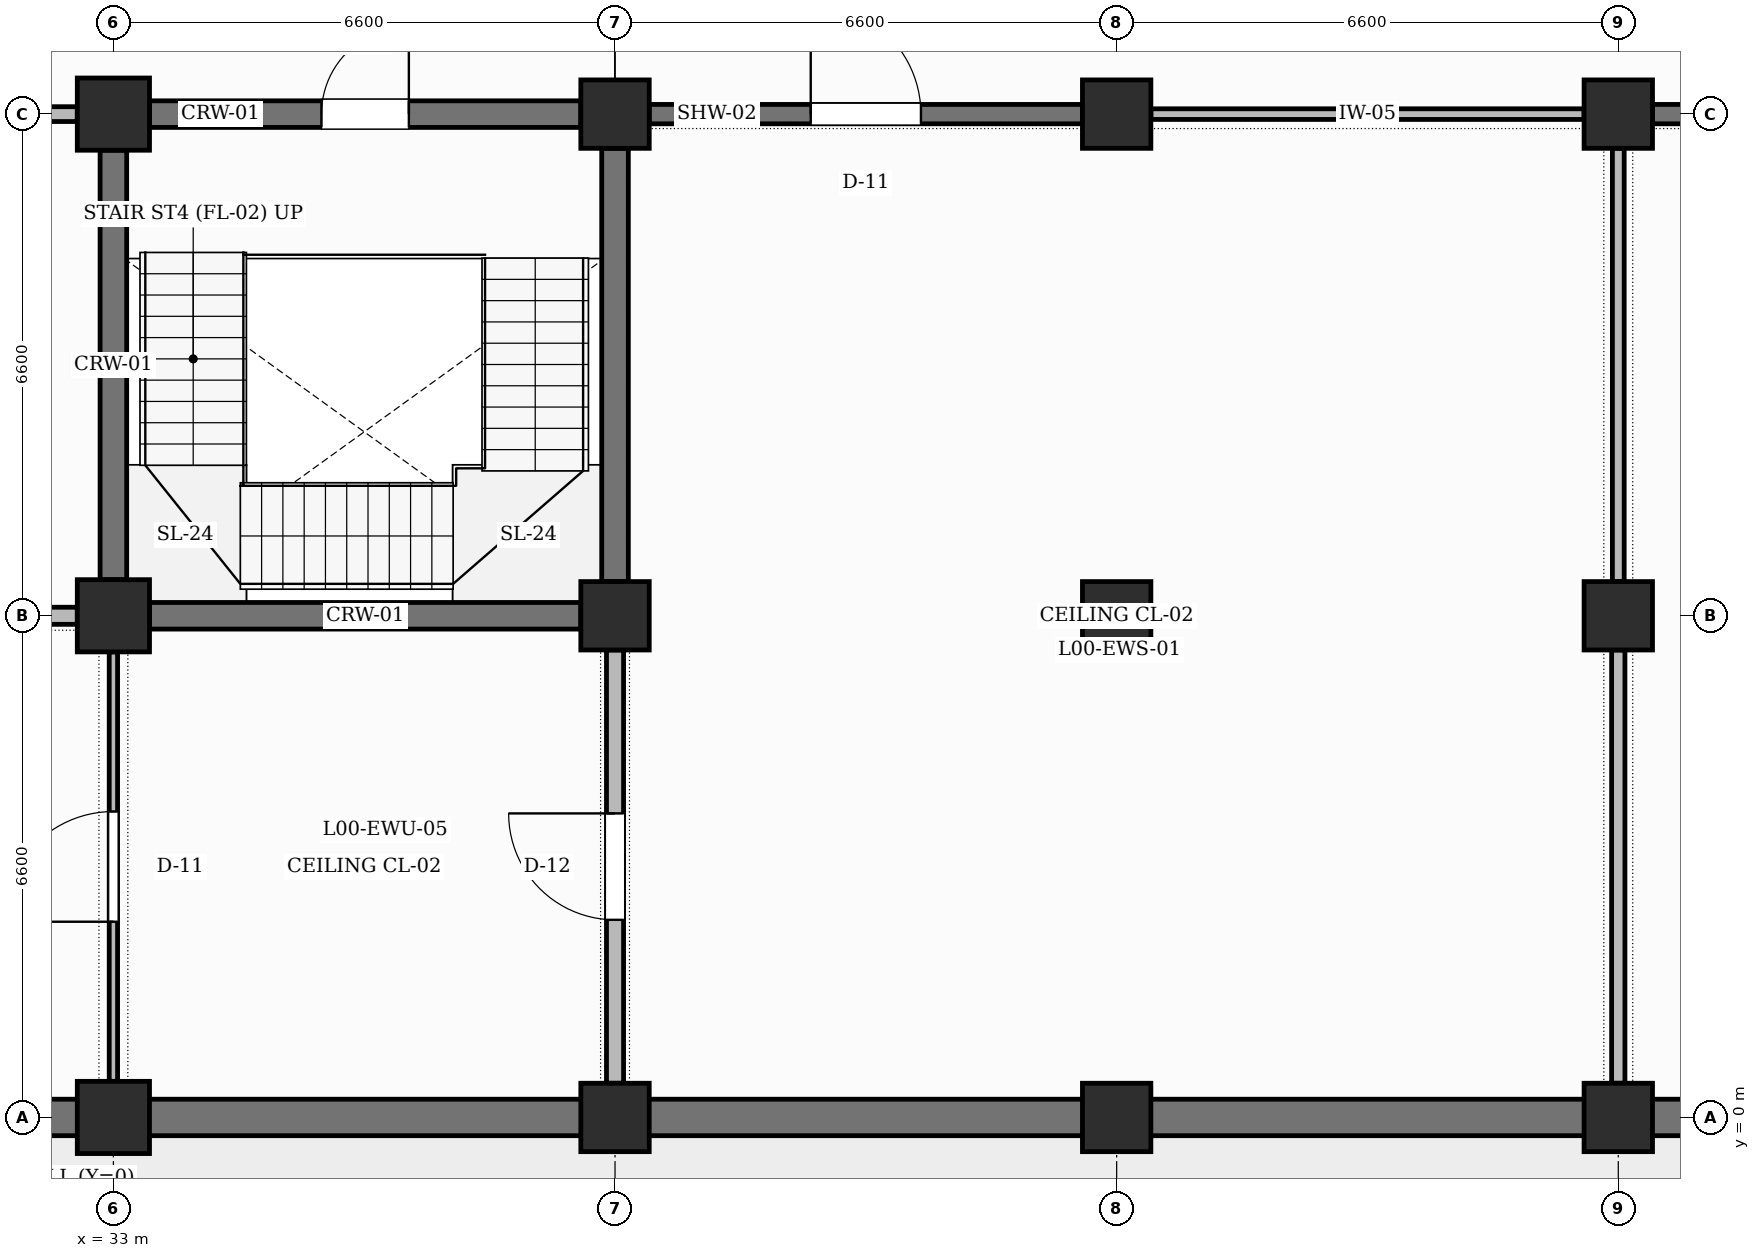
"""IFC4 building model, lengths in metres.
Left out: names, types, materials, properties, quantities, classifications, styles, units other than length and angle.
Written with IfcOpenShell. Run it as: python <this file> out.ifc"""

import sys

from ifc_helpers import new_model, si_unit, direction, frame, frame_2d, origin, origin_2d, place, context, subcontext, project, spatial, rectangle, extrude, element, fill, save


model = new_model("IFC4")
c1 = context("Model", 3, precision=1e-05, world=origin(), true_north=direction((0.0, 1.0)))
c2 = subcontext(c1, "Body", "Model", "MODEL_VIEW")
j1 = project(units=[si_unit("LENGTHUNIT", "METRE"), si_unit("PLANEANGLEUNIT", "RADIAN")], contexts=[c1])
p1 = place(None, origin())
s1 = spatial("IfcSite", under=j1, at=p1, CompositionType="ELEMENT")
p2 = place(p1, origin())
s2 = spatial("IfcBuilding", under=s1, at=p2, CompositionType="ELEMENT")
p3 = place(p2, origin())
s3 = spatial("IfcBuildingStorey", under=s2, at=p3, CompositionType="ELEMENT", Elevation=0.0)
for number, where, z_axis, x_axis in (
    (1, (33.0, 0.0, 0.0), (0.0, 0.0, 1.0), (1.0, 0.0, 0.0)),
    (2, (33.0, 6.6, 0.0), (0.0, 0.0, 1.0), (1.0, 0.0, 0.0)),
    (3, (33.0, 13.2, 0.0), (0.0, 0.0, 1.0), (1.0, 0.0, 0.0)),
):
    element("IfcColumn", number, at=place(p3, frame(where, z_axis=z_axis, x_axis=x_axis)), inside=s3, PredefinedType="COLUMN", context=c2, shape_type="SweptSolid", body=[
        extrude(rectangle(XDim=0.95, YDim=0.95, at=origin_2d()), origin(), (0.0, 0.0, 1.0), 5.4),
    ])
for number, where, z_axis, x_axis in (
    (4, (39.6, 0.0, 0.0), (0.0, 0.0, 1.0), (1.0, 0.0, 0.0)),
    (5, (39.6, 6.6, 0.0), (0.0, 0.0, 1.0), (1.0, 0.0, 0.0)),
    (6, (39.6, 13.2, 0.0), (0.0, 0.0, 1.0), (1.0, 0.0, 0.0)),
    (7, (46.2, 0.0, 0.0), (0.0, 0.0, 1.0), (1.0, 0.0, 0.0)),
    (8, (46.2, 6.6, 0.0), (0.0, 0.0, 1.0), (1.0, 0.0, 0.0)),
    (9, (46.2, 13.2, 0.0), (0.0, 0.0, 1.0), (1.0, 0.0, 0.0)),
    (10, (52.8, 0.0, 0.0), (0.0, 0.0, 1.0), (1.0, 0.0, 0.0)),
    (11, (52.8, 6.6, 0.0), (0.0, 0.0, 1.0), (1.0, 0.0, 0.0)),
    (12, (52.8, 13.2, 0.0), (0.0, 0.0, 1.0), (1.0, 0.0, 0.0)),
):
    element("IfcColumn", number, at=place(p3, frame(where, z_axis=z_axis, x_axis=x_axis)), inside=s3, PredefinedType="COLUMN", context=c2, shape_type="SweptSolid", body=[
        extrude(rectangle(XDim=0.9, YDim=0.9, at=origin_2d()), origin(), (0.0, 0.0, 1.0), 5.4),
    ])
p4 = place(p3, frame((26.875, 0.0, 0.0), z_axis=(0.0, 0.0, 1.0), x_axis=(1.0, 0.0, 0.0)))
e13 = element("IfcWall", 13, at=p4, inside=s3, PredefinedType="SOLIDWALL", context=c2, shape_type="SweptSolid", body=[
    extrude(rectangle(XDim=5.65, YDim=0.48, at=frame_2d((2.825, 0.0))), origin(), (0.0, 0.0, 1.0), 4.45),
])
p5 = place(p3, frame((33.475, 0.0, 0.0), z_axis=(0.0, 0.0, 1.0), x_axis=(1.0, 0.0, 0.0)))
e14 = element("IfcWall", 14, at=p5, inside=s3, PredefinedType="SOLIDWALL", context=c2, shape_type="SweptSolid", body=[
    extrude(rectangle(XDim=5.675, YDim=0.48, at=frame_2d((2.837, 0.0))), origin(), (0.0, 0.0, 1.0), 4.45),
])
p6 = place(p3, frame((40.05, 0.0, 0.0), z_axis=(0.0, 0.0, 1.0), x_axis=(1.0, 0.0, 0.0)))
e15 = element("IfcWall", 15, at=p6, inside=s3, PredefinedType="SOLIDWALL", context=c2, shape_type="SweptSolid", body=[
    extrude(rectangle(XDim=5.7, YDim=0.48, at=frame_2d((2.85, 0.0))), origin(), (0.0, 0.0, 1.0), 4.45),
])
p7 = place(p3, frame((46.65, 0.0, 0.0), z_axis=(0.0, 0.0, 1.0), x_axis=(1.0, 0.0, 0.0)))
e16 = element("IfcWall", 16, at=p7, inside=s3, PredefinedType="SOLIDWALL", context=c2, shape_type="SweptSolid", body=[
    extrude(rectangle(XDim=5.7, YDim=0.48, at=frame_2d((2.85, 0.0))), origin(), (0.0, 0.0, 1.0), 4.45),
])
p8 = place(p3, frame((53.25, 0.0, 0.0), z_axis=(0.0, 0.0, 1.0), x_axis=(1.0, 0.0, 0.0)))
e17 = element("IfcWall", 17, at=p8, inside=s3, PredefinedType="SOLIDWALL", context=c2, shape_type="SweptSolid", body=[
    extrude(rectangle(XDim=5.7, YDim=0.48, at=frame_2d((2.85, 0.0))), origin(), (0.0, 0.0, 1.0), 4.45),
])
p9 = place(p3, frame((33.475, 6.6, 0.0), z_axis=(0.0, 0.0, 1.0), x_axis=(1.0, 0.0, 0.0)))
e18 = element("IfcWall", 18, at=p9, inside=s3, PredefinedType="SHEAR", context=c2, shape_type="SweptSolid", body=[
    extrude(rectangle(XDim=5.675, YDim=0.35, at=frame_2d((2.837, 0.0))), origin(), (0.0, 0.0, 1.0), 4.2),
])
p10 = place(p3, frame((33.475, 13.2, 0.0), z_axis=(0.0, 0.0, 1.0), x_axis=(1.0, 0.0, 0.0)))
e19 = element("IfcWall", 19, at=p10, inside=s3, PredefinedType="SHEAR", context=c2, shape_type="SweptSolid", body=[
    extrude(rectangle(XDim=5.675, YDim=0.35, at=frame_2d((2.837, 0.0))), origin(), (0.0, 0.0, 1.0), 4.3),
])
p11 = place(p10, frame((2.262, 0.0, 0.0)))
e20 = element("IfcOpeningElement", 20, at=p11, cuts=e19, PredefinedType="OPENING", context=c2, shape_type="SweptSolid", body=[
    extrude(rectangle(XDim=1.15, YDim=2.2, at=frame_2d((0.575, 1.1))), frame((0.0, 0.185, 0.0), z_axis=(0.0, -1.0, 0.0), x_axis=(1.0, 0.0, 0.0)), (0.0, 0.0, 1.0), 0.37),
])
p12 = place(p3, frame((33.0, 7.075, 0.0), z_axis=(0.0, 0.0, 1.0), x_axis=(0.0, 1.0, 0.0)))
e21 = element("IfcWall", 21, at=p12, inside=s3, PredefinedType="SHEAR", context=c2, shape_type="SweptSolid", body=[
    extrude(rectangle(XDim=5.65, YDim=0.35, at=frame_2d((2.825, 0.0))), origin(), (0.0, 0.0, 1.0), 4.3),
])
p13 = place(p3, frame((39.6, 7.05, 0.0), z_axis=(0.0, 0.0, 1.0), x_axis=(0.0, 1.0, 0.0)))
e22 = element("IfcWall", 22, at=p13, inside=s3, PredefinedType="SHEAR", context=c2, shape_type="SweptSolid", body=[
    extrude(rectangle(XDim=5.7, YDim=0.35, at=frame_2d((2.85, 0.0))), origin(), (0.0, 0.0, 1.0), 4.3),
])
p14 = place(p3, frame((33.0, 0.475, 0.0), z_axis=(0.0, 0.0, 1.0), x_axis=(0.0, 1.0, 0.0)))
e23 = element("IfcWall", 23, at=p14, inside=s3, PredefinedType="PARTITIONING", context=c2, shape_type="SweptSolid", body=[
    extrude(rectangle(XDim=5.65, YDim=0.11, at=frame_2d((2.825, 0.0))), origin(), (0.0, 0.0, 1.0), 4.3),
])
p15 = place(p14, frame((2.1, 0.0, 0.0)))
e24 = element("IfcOpeningElement", 24, at=p15, cuts=e23, PredefinedType="OPENING", context=c2, shape_type="SweptSolid", body=[
    extrude(rectangle(XDim=1.45, YDim=2.25, at=frame_2d((0.725, 1.125))), frame((0.0, 0.065, 0.0), z_axis=(0.0, -1.0, 0.0), x_axis=(1.0, 0.0, 0.0)), (0.0, 0.0, 1.0), 0.13),
])
p16 = place(p3, frame((26.875, 6.6, 0.0), z_axis=(0.0, 0.0, 1.0), x_axis=(1.0, 0.0, 0.0)))
e25 = element("IfcWall", 25, at=p16, inside=s3, PredefinedType="PARTITIONING", context=c2, shape_type="SweptSolid", body=[
    extrude(rectangle(XDim=5.65, YDim=0.225, at=frame_2d((2.825, 0.0))), origin(), (0.0, 0.0, 1.0), 4.3),
])
p17 = place(p3, frame((26.875, 13.2, 0.0), z_axis=(0.0, 0.0, 1.0), x_axis=(1.0, 0.0, 0.0)))
e26 = element("IfcWall", 26, at=p17, inside=s3, PredefinedType="PARTITIONING", context=c2, shape_type="SweptSolid", body=[
    extrude(rectangle(XDim=5.65, YDim=0.195, at=frame_2d((2.825, 0.0))), origin(), (0.0, 0.0, 1.0), 4.2),
])
p18 = place(p17, frame((2.225, 0.0, 0.0)))
e27 = element("IfcOpeningElement", 27, at=p18, cuts=e26, PredefinedType="OPENING", context=c2, shape_type="SweptSolid", body=[
    extrude(rectangle(XDim=1.2, YDim=2.25, at=frame_2d((0.6, 1.125))), frame((0.0, 0.107, 0.0), z_axis=(0.0, -1.0, 0.0), x_axis=(1.0, 0.0, 0.0)), (0.0, 0.0, 1.0), 0.215),
])
p19 = place(p3, frame((39.6, 0.45, 0.0), z_axis=(0.0, 0.0, 1.0), x_axis=(0.0, 1.0, 0.0)))
e28 = element("IfcWall", 28, at=p19, inside=s3, PredefinedType="PARTITIONING", context=c2, shape_type="SweptSolid", body=[
    extrude(rectangle(XDim=5.7, YDim=0.225, at=frame_2d((2.85, 0.0))), origin(), (0.0, 0.0, 1.0), 4.3),
])
p20 = place(p19, frame((2.15, 0.0, 0.0)))
e29 = element("IfcOpeningElement", 29, at=p20, cuts=e28, PredefinedType="OPENING", context=c2, shape_type="SweptSolid", body=[
    extrude(rectangle(XDim=1.4, YDim=2.25, at=frame_2d((0.7, 1.125))), frame((0.0, 0.123, 0.0), z_axis=(0.0, -1.0, 0.0), x_axis=(1.0, 0.0, 0.0)), (0.0, 0.0, 1.0), 0.245),
])
p21 = place(p3, frame((40.05, 13.2, 0.0), z_axis=(0.0, 0.0, 1.0), x_axis=(1.0, 0.0, 0.0)))
e30 = element("IfcWall", 30, at=p21, inside=s3, PredefinedType="SHEAR", context=c2, shape_type="SweptSolid", body=[
    extrude(rectangle(XDim=5.7, YDim=0.255, at=frame_2d((2.85, 0.0))), origin(), (0.0, 0.0, 1.0), 4.2),
])
p22 = place(p21, frame((2.125, 0.0, 0.0)))
e31 = element("IfcOpeningElement", 31, at=p22, cuts=e30, PredefinedType="OPENING", context=c2, shape_type="SweptSolid", body=[
    extrude(rectangle(XDim=1.45, YDim=2.25, at=frame_2d((0.725, 1.125))), frame((0.0, 0.137, 0.0), z_axis=(0.0, -1.0, 0.0), x_axis=(1.0, 0.0, 0.0)), (0.0, 0.0, 1.0), 0.275),
])
p23 = place(p3, frame((52.8, 0.45, 0.0), z_axis=(0.0, 0.0, 1.0), x_axis=(0.0, 1.0, 0.0)))
e32 = element("IfcWall", 32, at=p23, inside=s3, PredefinedType="PARTITIONING", context=c2, shape_type="SweptSolid", body=[
    extrude(rectangle(XDim=5.7, YDim=0.175, at=frame_2d((2.85, 0.0))), origin(), (0.0, 0.0, 1.0), 4.3),
])
p24 = place(p3, frame((52.8, 7.05, 0.0), z_axis=(0.0, 0.0, 1.0), x_axis=(0.0, 1.0, 0.0)))
e33 = element("IfcWall", 33, at=p24, inside=s3, PredefinedType="PARTITIONING", context=c2, shape_type="SweptSolid", body=[
    extrude(rectangle(XDim=5.7, YDim=0.155, at=frame_2d((2.85, 0.0))), origin(), (0.0, 0.0, 1.0), 4.3),
])
p25 = place(p3, frame((46.65, 13.2, 0.0), z_axis=(0.0, 0.0, 1.0), x_axis=(1.0, 0.0, 0.0)))
e34 = element("IfcWall", 34, at=p25, inside=s3, PredefinedType="PARTITIONING", context=c2, shape_type="SweptSolid", body=[
    extrude(rectangle(XDim=5.7, YDim=0.14, at=frame_2d((2.85, 0.0))), origin(), (0.0, 0.0, 1.0), 4.3),
])
p26 = place(p3, frame((53.25, 13.2, 0.0), z_axis=(0.0, 0.0, 1.0), x_axis=(1.0, 0.0, 0.0)))
e35 = element("IfcWall", 35, at=p26, inside=s3, PredefinedType="SHEAR", context=c2, shape_type="SweptSolid", body=[
    extrude(rectangle(XDim=5.7, YDim=0.255, at=frame_2d((2.85, 0.0))), origin(), (0.0, 0.0, 1.0), 4.2),
])
p27 = place(p26, frame((2.15, 0.0, 0.0)))
e36 = element("IfcOpeningElement", 36, at=p27, cuts=e35, PredefinedType="OPENING", context=c2, shape_type="SweptSolid", body=[
    extrude(rectangle(XDim=1.4, YDim=2.25, at=frame_2d((0.7, 1.125))), frame((0.0, 0.137, 0.0), z_axis=(0.0, -1.0, 0.0), x_axis=(1.0, 0.0, 0.0)), (0.0, 0.0, 1.0), 0.275),
])
p28 = place(p11, origin())
e37 = element("IfcDoor", 37, at=p28, inside=s3, OperationType="SINGLE_SWING_RIGHT", PredefinedType="DOOR", context=c2, shape_type="SweptSolid", body=[
    extrude(rectangle(XDim=1.15, YDim=2.2, at=frame_2d((0.575, 1.1))), frame((0.0, 0.025, 0.0), z_axis=(0.0, -1.0, 0.0), x_axis=(1.0, 0.0, 0.0)), (0.0, 0.0, 1.0), 0.05),
])
fill(e20, e37)
p29 = place(p22, origin())
e38 = element("IfcDoor", 38, at=p29, inside=s3, OperationType="SINGLE_SWING_LEFT", PredefinedType="DOOR", context=c2, shape_type="SweptSolid", body=[
    extrude(rectangle(XDim=1.45, YDim=2.25, at=frame_2d((0.725, 1.125))), frame((0.0, 0.025, 0.0), z_axis=(0.0, -1.0, 0.0), x_axis=(1.0, 0.0, 0.0)), (0.0, 0.0, 1.0), 0.05),
])
fill(e31, e38)
p30 = place(p15, origin())
e39 = element("IfcDoor", 39, at=p30, inside=s3, OperationType="SINGLE_SWING_LEFT", PredefinedType="DOOR", context=c2, shape_type="SweptSolid", body=[
    extrude(rectangle(XDim=1.45, YDim=2.25, at=frame_2d((0.725, 1.125))), frame((0.0, 0.025, 0.0), z_axis=(0.0, -1.0, 0.0), x_axis=(1.0, 0.0, 0.0)), (0.0, 0.0, 1.0), 0.05),
])
fill(e24, e39)
p31 = place(p20, origin())
e40 = element("IfcDoor", 40, at=p31, inside=s3, OperationType="SINGLE_SWING_RIGHT", PredefinedType="DOOR", context=c2, shape_type="SweptSolid", body=[
    extrude(rectangle(XDim=1.4, YDim=2.25, at=frame_2d((0.7, 1.125))), frame((0.0, 0.025, 0.0), z_axis=(0.0, -1.0, 0.0), x_axis=(1.0, 0.0, 0.0)), (0.0, 0.0, 1.0), 0.05),
])
fill(e29, e40)
save(model, sys.argv[1])
